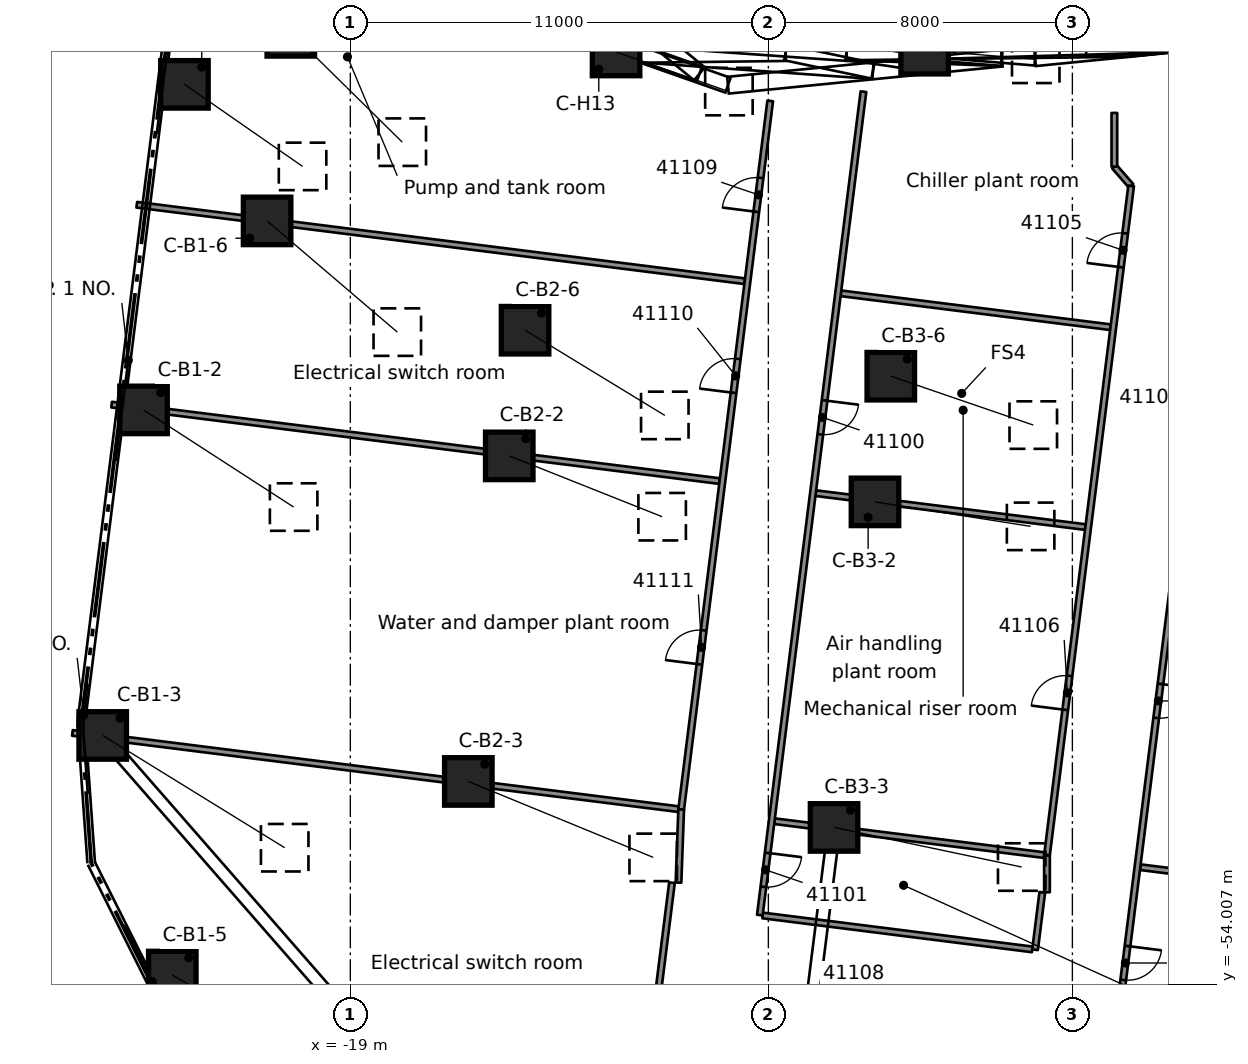
"""IFC4 building model, lengths in metres.
Left out: names, types, materials, properties, quantities, classifications, styles, units other than length and angle.
Written with IfcOpenShell. Run it as: python <this file> out.ifc"""

import sys

from ifc_helpers import new_model, si_unit, direction, frame, frame_2d, origin, origin_2d, place, context, subcontext, project, spatial, rectangle, extrude, element, fill, save


model = new_model("IFC4")
c1 = context("Model", 3, precision=1e-05, world=origin(), true_north=direction((0.0, 1.0)))
c2 = subcontext(c1, "Body", "Model", "MODEL_VIEW")
j1 = project(units=[si_unit("LENGTHUNIT", "METRE"), si_unit("PLANEANGLEUNIT", "RADIAN")], contexts=[c1])
p1 = place(None, origin())
s1 = spatial("IfcSite", under=j1, at=p1, CompositionType="ELEMENT")
p2 = place(p1, origin())
s2 = spatial("IfcBuilding", under=s1, at=p2, CompositionType="ELEMENT")
p3 = place(p2, frame((0.0, 0.0, 206.1)))
s3 = spatial("IfcBuildingStorey", under=s2, at=p3, CompositionType="ELEMENT", Elevation=206.1)
p4 = place(p3, frame((-23.365, -30.322, 0.46), z_axis=(0.604547981871, -0.419954265804, 0.676875285594), x_axis=(0.570514289854, 0.821287674979, 0.0)))
e1 = element("IfcColumn", 1, at=p4, inside=s3, PredefinedType="COLUMN", context=c2, shape_type="SweptSolid", body=[
    extrude(rectangle(XDim=1.25, YDim=1.25, at=origin_2d()), origin(), (0.0, 0.0, 1.0), 5.141),
])
p5 = place(p3, frame((-24.442, -38.888, 0.507), z_axis=(0.681472154292, -0.44100460198, 0.584046782336), x_axis=(0.543296460318, 0.839540919912, 0.0)))
e2 = element("IfcColumn", 2, at=p5, inside=s3, PredefinedType="COLUMN", context=c2, shape_type="SweptSolid", body=[
    extrude(rectangle(XDim=1.25, YDim=1.25, at=origin_2d()), origin(), (0.0, 0.0, 1.0), 5.796),
])
p6 = place(p3, frame((-25.516, -47.454, 0.538), z_axis=(0.732821218952, -0.451998568928, 0.50859645569), x_axis=(0.524966240831, 0.851123049851, 0.0)))
e3 = element("IfcColumn", 3, at=p6, inside=s3, PredefinedType="COLUMN", context=c2, shape_type="SweptSolid", body=[
    extrude(rectangle(XDim=1.25, YDim=1.25, at=origin_2d()), origin(), (0.0, 0.0, 1.0), 6.535),
])
p7 = place(p3, frame((-23.685, -53.758, 0.552), z_axis=(0.767524718549, -0.437360648077, 0.468637887852), x_axis=(0.495093298887, 0.86883981573, 0.0)))
e4 = element("IfcColumn", 4, at=p7, inside=s3, PredefinedType="COLUMN", context=c2, shape_type="SweptSolid", body=[
    extrude(rectangle(XDim=1.25, YDim=1.25, at=origin_2d()), origin(), (0.0, 0.0, 1.0), 7.033),
])
p8 = place(p3, frame((-21.19, -33.915, 0.499), z_axis=(0.60682574595, -0.518264559624, 0.602631197574), x_axis=(0.649438201848, 0.76041437518, 0.0)))
e5 = element("IfcColumn", 5, at=p8, inside=s3, PredefinedType="COLUMN", context=c2, shape_type="SweptSolid", body=[
    extrude(rectangle(XDim=1.25, YDim=1.25, at=origin_2d()), origin(), (0.0, 0.0, 1.0), 5.646),
])
p9 = place(p3, frame((-20.566, -28.954, 0.479), z_axis=(0.546625765271, -0.538435251848, 0.641317201009), x_axis=(0.701749238888, 0.712424035052, 0.0)))
e6 = element("IfcColumn", 6, at=p9, inside=s3, PredefinedType="COLUMN", context=c2, shape_type="SweptSolid", body=[
    extrude(rectangle(XDim=1.25, YDim=1.25, at=origin_2d()), origin(), (0.0, 0.0, 1.0), 5.365),
])
p10 = place(p3, frame((-14.818, -40.098, 0.49), z_axis=(0.729256121649, -0.29003851091, 0.619728304361), x_axis=(0.369562231152, 0.929205982173, 0.0)))
e7 = element("IfcColumn", 7, at=p10, inside=s3, PredefinedType="COLUMN", context=c2, shape_type="SweptSolid", body=[
    extrude(rectangle(XDim=1.25, YDim=1.25, at=origin_2d()), origin(), (0.0, 0.0, 1.0), 5.517),
])
p11 = place(p3, frame((-15.895, -48.664, 0.527), z_axis=(0.780516487065, -0.320557380948, 0.536690766587), x_axis=(0.379906795969, 0.925024770683, 0.0)))
e8 = element("IfcColumn", 8, at=p11, inside=s3, PredefinedType="COLUMN", context=c2, shape_type="SweptSolid", body=[
    extrude(rectangle(XDim=1.25, YDim=1.25, at=origin_2d()), origin(), (0.0, 0.0, 1.0), 6.233),
])
p12 = place(p3, frame((-14.402, -36.791, 0.489), z_axis=(0.668536196843, -0.40762020421, 0.622016979375), x_axis=(0.520585249555, 0.853809696564, 0.0)))
e9 = element("IfcColumn", 9, at=p12, inside=s3, PredefinedType="COLUMN", context=c2, shape_type="SweptSolid", body=[
    extrude(rectangle(XDim=1.25, YDim=1.25, at=origin_2d()), origin(), (0.0, 0.0, 1.0), 5.5),
])
p13 = place(p3, frame((-5.194, -41.308, 0.481), z_axis=(0.760399313184, -0.119547665228, 0.638358238177), x_axis=(0.155309269124, 0.987865897237, 0.0)))
e10 = element("IfcColumn", 10, at=p13, inside=s3, PredefinedType="COLUMN", context=c2, shape_type="SweptSolid", body=[
    extrude(rectangle(XDim=1.25, YDim=1.25, at=origin_2d()), origin(), (0.0, 0.0, 1.0), 5.385),
])
p14 = place(p3, frame((-6.271, -49.874, 0.52), z_axis=(0.814502781534, -0.171872731711, 0.554116398393), x_axis=(0.206468811523, 0.978453182257, 0.0)))
e11 = element("IfcColumn", 11, at=p14, inside=s3, PredefinedType="COLUMN", context=c2, shape_type="SweptSolid", body=[
    extrude(rectangle(XDim=1.25, YDim=1.25, at=origin_2d()), origin(), (0.0, 0.0, 1.0), 6.062),
])
p15 = place(p3, frame((-4.778, -38.001, 0.471), z_axis=(0.71272637294, -0.244506546799, 0.657447842713), x_axis=(0.324494397728, 0.945887617978, 0.0)))
e12 = element("IfcColumn", 12, at=p15, inside=s3, PredefinedType="COLUMN", context=c2, shape_type="SweptSolid", body=[
    extrude(rectangle(XDim=1.25, YDim=1.25, at=origin_2d()), origin(), (0.0, 0.0, 1.0), 5.26),
])
p16 = place(p3, frame((-3.888, -29.423, 0.394), z_axis=(0.628357788529, -0.051576127766, 0.776212852663), x_axis=(0.081805717627, 0.99664829532, 0.0)))
e13 = element("IfcColumn", 13, at=p16, inside=s3, PredefinedType="COLUMN", context=c2, shape_type="SweptSolid", body=[
    extrude(rectangle(XDim=1.25, YDim=1.25, at=origin_2d()), origin(), (0.0, 0.0, 1.0), 4.653),
])
p17 = place(p3, frame((-12.007, -29.47, 0.413), z_axis=(0.623513084536, -0.21882689292, 0.750563937548), x_axis=(0.331155585117, 0.943576164623, 0.0)))
e14 = element("IfcColumn", 14, at=p17, inside=s3, PredefinedType="COLUMN", context=c2, shape_type="SweptSolid", body=[
    extrude(rectangle(XDim=1.25, YDim=1.25, at=origin_2d()), origin(), (0.0, 0.0, 1.0), 4.762),
])
p18 = place(p3, frame((-8.15, -52.19, 0.0), z_axis=(0.0, 0.0, 1.0), x_axis=(0.992168754775, -0.124904611796, 0.0)))
e15 = element("IfcWall", 15, at=p18, inside=s3, PredefinedType="PARTITIONING", context=c2, shape_type="SweptSolid", body=[
    extrude(rectangle(XDim=7.15, YDim=0.15, at=frame_2d((3.575, 0.0))), origin(), (0.0, 0.0, 1.0), 3.98),
])
p19 = place(p3, frame((-26.313, -47.387, 0.0), z_axis=(0.0, 0.0, 1.0), x_axis=(0.992178228876, -0.124829332068, 0.0)))
e16 = element("IfcWall", 16, at=p19, inside=s3, PredefinedType="PARTITIONING", context=c2, shape_type="SweptSolid", body=[
    extrude(rectangle(XDim=16.071, YDim=0.15, at=frame_2d((8.035, 0.0))), origin(), (0.0, 0.0, 1.0), 3.98),
])
p20 = place(p3, frame((-7.838, -49.71, 0.0), z_axis=(0.0, 0.0, 1.0), x_axis=(0.992173014732, -0.124870768549, 0.0)))
e17 = element("IfcWall", 17, at=p20, inside=s3, PredefinedType="PARTITIONING", context=c2, shape_type="SweptSolid", body=[
    extrude(rectangle(XDim=7.152, YDim=0.15, at=frame_2d((3.576, 0.0))), origin(), (0.0, 0.0, 1.0), 3.98),
])
p21 = place(p3, frame((1.787, -50.92, 0.0), z_axis=(0.0, 0.0, 1.0), x_axis=(0.992180531957, -0.12481102518, 0.0)))
e18 = element("IfcWall", 18, at=p21, inside=s3, PredefinedType="PARTITIONING", context=c2, shape_type="SweptSolid", body=[
    extrude(rectangle(XDim=16.914, YDim=0.15, at=frame_2d((8.457, 0.0))), origin(), (0.0, 0.0, 1.0), 3.98),
])
p22 = place(p3, frame((-25.282, -38.749, 0.0), z_axis=(0.0, 0.0, 1.0), x_axis=(0.99218536192, -0.124772623567, 0.0)))
e19 = element("IfcWall", 19, at=p22, inside=s3, PredefinedType="PARTITIONING", context=c2, shape_type="SweptSolid", body=[
    extrude(rectangle(XDim=16.125, YDim=0.15, at=frame_2d((8.062, 0.0))), origin(), (0.0, 0.0, 1.0), 3.98),
])
p23 = place(p3, frame((-6.752, -41.078, 0.0), z_axis=(0.0, 0.0, 1.0), x_axis=(0.992168754775, -0.124904611796, 0.0)))
e20 = element("IfcWall", 20, at=p23, inside=s3, PredefinedType="PARTITIONING", context=c2, shape_type="SweptSolid", body=[
    extrude(rectangle(XDim=7.15, YDim=0.15, at=frame_2d((3.575, 0.0))), origin(), (0.0, 0.0, 1.0), 3.98),
])
p24 = place(p3, frame((-24.62, -33.49, 0.0), z_axis=(0.0, 0.0, 1.0), x_axis=(0.992184418995, -0.124780121428, 0.0)))
e21 = element("IfcWall", 21, at=p24, inside=s3, PredefinedType="PARTITIONING", context=c2, shape_type="SweptSolid", body=[
    extrude(rectangle(XDim=16.124, YDim=0.15, at=frame_2d((8.062, 0.0))), origin(), (0.0, 0.0, 1.0), 3.98),
])
p25 = place(p3, frame((-6.091, -35.82, 0.0), z_axis=(0.0, 0.0, 1.0), x_axis=(0.992189898708, -0.124736541969, 0.0)))
e22 = element("IfcWall", 22, at=p25, inside=s3, PredefinedType="PARTITIONING", context=c2, shape_type="SweptSolid", body=[
    extrude(rectangle(XDim=7.15, YDim=0.15, at=frame_2d((3.575, 0.0))), origin(), (0.0, 0.0, 1.0), 3.98),
])
p26 = place(p3, frame((1.105, -32.488, 0.0), z_axis=(0.0, 0.0, 1.0), x_axis=(0.657060992412, -0.753837417651, 0.0)))
e23 = element("IfcWall", 23, at=p26, inside=s3, PredefinedType="PARTITIONING", context=c2, shape_type="SweptSolid", body=[
    extrude(rectangle(XDim=0.671, YDim=0.15, at=frame_2d((0.335, 0.0))), origin(), (0.0, 0.0, 1.0), 3.98),
])
p27 = place(p3, frame((-10.943, -54.561, 0.0), z_axis=(0.0, 0.0, 1.0), x_axis=(0.124928843821, 0.992165703893, 0.0)))
e24 = element("IfcWall", 24, at=p27, inside=s3, PredefinedType="PARTITIONING", context=c2, shape_type="SweptSolid", body=[
    extrude(rectangle(XDim=3.26, YDim=0.15, at=frame_2d((1.63, 0.0))), origin(), (0.0, 0.0, 1.0), 3.98),
])
p28 = place(p3, frame((4.328, -30.123, 0.0), z_axis=(0.0, 0.0, 1.0), x_axis=(-0.124803349917, -0.992181497434, 0.0)))
e25 = element("IfcWall", 25, at=p28, inside=s3, PredefinedType="PARTITIONING", context=c2, shape_type="SweptSolid", body=[
    extrude(rectangle(XDim=26.153, YDim=0.15, at=frame_2d((13.076, 0.0))), origin(), (0.0, 0.0, 1.0), 3.98),
])
p29 = place(p28, frame((2.946, 0.0, 0.0)))
e26 = element("IfcOpeningElement", 26, at=p29, cuts=e25, PredefinedType="OPENING", context=c2, shape_type="SweptSolid", body=[
    extrude(rectangle(XDim=0.9, YDim=2.1, at=frame_2d((0.45, 1.05))), frame((0.0, 0.085, 0.0), z_axis=(0.0, -1.0, 0.0), x_axis=(1.0, 0.0, 0.0)), (0.0, 0.0, 1.0), 0.17),
])
p30 = place(p28, frame((9.803, 0.0, 0.0)))
e27 = element("IfcOpeningElement", 27, at=p30, cuts=e25, PredefinedType="OPENING", context=c2, shape_type="SweptSolid", body=[
    extrude(rectangle(XDim=0.9, YDim=2.1, at=frame_2d((0.45, 1.05))), frame((0.0, 0.085, 0.0), z_axis=(0.0, -1.0, 0.0), x_axis=(1.0, 0.0, 0.0)), (0.0, 0.0, 1.0), 0.17),
])
p31 = place(p28, frame((16.102, 0.0, 0.0)))
e28 = element("IfcOpeningElement", 28, at=p31, cuts=e25, PredefinedType="OPENING", context=c2, shape_type="SweptSolid", body=[
    extrude(rectangle(XDim=0.9, YDim=2.1, at=frame_2d((0.45, 1.05))), frame((0.0, 0.085, 0.0), z_axis=(0.0, -1.0, 0.0), x_axis=(1.0, 0.0, 0.0)), (0.0, 0.0, 1.0), 0.17),
])
p32 = place(p28, frame((23.052, 0.0, 0.0)))
e29 = element("IfcOpeningElement", 29, at=p32, cuts=e25, PredefinedType="OPENING", context=c2, shape_type="SweptSolid", body=[
    extrude(rectangle(XDim=0.9, YDim=2.1, at=frame_2d((0.45, 1.05))), frame((0.0, 0.085, 0.0), z_axis=(0.0, -1.0, 0.0), x_axis=(1.0, 0.0, 0.0)), (0.0, 0.0, 1.0), 0.17),
])
p33 = place(p28, frame((0.2, 0.0, 0.0)))
e30 = element("IfcOpeningElement", 30, at=p33, cuts=e25, PredefinedType="OPENING", context=c2, shape_type="SweptSolid", body=[
    extrude(rectangle(XDim=0.9, YDim=2.1, at=frame_2d((0.45, 1.05))), frame((0.0, 0.085, 0.0), z_axis=(0.0, -1.0, 0.0), x_axis=(1.0, 0.0, 0.0)), (0.0, 0.0, 1.0), 0.17),
])
p34 = place(p3, frame((-0.982, -53.092, 0.0), z_axis=(0.0, 0.0, 1.0), x_axis=(0.12472529348, 0.992191312785, 0.0)))
e31 = element("IfcWall", 31, at=p34, inside=s3, PredefinedType="PARTITIONING", context=c2, shape_type="SweptSolid", body=[
    extrude(rectangle(XDim=1.523, YDim=0.15, at=frame_2d((0.761, 0.0))), origin(), (0.0, 0.0, 1.0), 3.98),
])
p35 = place(p3, frame((-0.668, -50.6, 0.0), z_axis=(0.0, 0.0, 1.0), x_axis=(0.124761144716, 0.99218680538, 0.0)))
e32 = element("IfcWall", 32, at=p35, inside=s3, PredefinedType="PARTITIONING", context=c2, shape_type="SweptSolid", body=[
    extrude(rectangle(XDim=17.745, YDim=0.15, at=frame_2d((8.873, 0.0))), origin(), (0.0, 0.0, 1.0), 3.98),
])
p36 = place(p35, frame((15.588, 0.0, 0.0)))
e33 = element("IfcOpeningElement", 33, at=p36, cuts=e32, PredefinedType="OPENING", context=c2, shape_type="SweptSolid", body=[
    extrude(rectangle(XDim=0.9, YDim=2.1, at=frame_2d((0.45, 1.05))), frame((0.0, 0.085, 0.0), z_axis=(0.0, -1.0, 0.0), x_axis=(1.0, 0.0, 0.0)), (0.0, 0.0, 1.0), 0.17),
])
p37 = place(p35, frame((3.85, 0.0, 0.0)))
e34 = element("IfcOpeningElement", 34, at=p37, cuts=e32, PredefinedType="OPENING", context=c2, shape_type="SweptSolid", body=[
    extrude(rectangle(XDim=0.9, YDim=2.1, at=frame_2d((0.45, 1.05))), frame((0.0, 0.085, 0.0), z_axis=(0.0, -1.0, 0.0), x_axis=(1.0, 0.0, 0.0)), (0.0, 0.0, 1.0), 0.17),
])
p38 = place(p3, frame((-5.498, -30.515, 0.0), z_axis=(0.0, 0.0, 1.0), x_axis=(-0.12483829345, -0.992177101373, 0.0)))
e35 = element("IfcWall", 35, at=p38, inside=s3, PredefinedType="PARTITIONING", context=c2, shape_type="SweptSolid", body=[
    extrude(rectangle(XDim=21.837, YDim=0.15, at=frame_2d((10.918, 0.0))), origin(), (0.0, 0.0, 1.0), 3.98),
])
p39 = place(p38, frame((8.188, 0.0, 0.0)))
e36 = element("IfcOpeningElement", 36, at=p39, cuts=e35, PredefinedType="OPENING", context=c2, shape_type="SweptSolid", body=[
    extrude(rectangle(XDim=0.9, YDim=2.1, at=frame_2d((0.45, 1.05))), frame((0.0, 0.085, 0.0), z_axis=(0.0, -1.0, 0.0), x_axis=(1.0, 0.0, 0.0)), (0.0, 0.0, 1.0), 0.17),
])
p40 = place(p38, frame((20.187, 0.0, 0.0)))
e37 = element("IfcOpeningElement", 37, at=p40, cuts=e35, PredefinedType="OPENING", context=c2, shape_type="SweptSolid", body=[
    extrude(rectangle(XDim=0.9, YDim=2.1, at=frame_2d((0.45, 1.05))), frame((0.0, 0.085, 0.0), z_axis=(0.0, -1.0, 0.0), x_axis=(1.0, 0.0, 0.0)), (0.0, 0.0, 1.0), 0.17),
])
p41 = place(p3, frame((-10.294, -49.402, 0.0), z_axis=(0.0, 0.0, 1.0), x_axis=(0.124690335959, 0.992195706561, 0.0)))
e38 = element("IfcWall", 38, at=p41, inside=s3, PredefinedType="PARTITIONING", context=c2, shape_type="SweptSolid", body=[
    extrude(rectangle(XDim=18.791, YDim=0.15, at=frame_2d((9.396, 0.0))), origin(), (0.0, 0.0, 1.0), 3.98),
])
p42 = place(p41, frame((15.85, 0.0, 0.0)))
e39 = element("IfcOpeningElement", 39, at=p42, cuts=e38, PredefinedType="OPENING", context=c2, shape_type="SweptSolid", body=[
    extrude(rectangle(XDim=0.9, YDim=2.1, at=frame_2d((0.45, 1.05))), frame((0.0, 0.085, 0.0), z_axis=(0.0, -1.0, 0.0), x_axis=(1.0, 0.0, 0.0)), (0.0, 0.0, 1.0), 0.17),
])
p43 = place(p41, frame((11.05, 0.0, 0.0)))
e40 = element("IfcOpeningElement", 40, at=p43, cuts=e38, PredefinedType="OPENING", context=c2, shape_type="SweptSolid", body=[
    extrude(rectangle(XDim=0.9, YDim=2.1, at=frame_2d((0.45, 1.05))), frame((0.0, 0.085, 0.0), z_axis=(0.0, -1.0, 0.0), x_axis=(1.0, 0.0, 0.0)), (0.0, 0.0, 1.0), 0.17),
])
p44 = place(p41, frame((3.85, 0.0, 0.0)))
e41 = element("IfcOpeningElement", 41, at=p44, cuts=e38, PredefinedType="OPENING", context=c2, shape_type="SweptSolid", body=[
    extrude(rectangle(XDim=0.9, YDim=2.1, at=frame_2d((0.45, 1.05))), frame((0.0, 0.085, 0.0), z_axis=(0.0, -1.0, 0.0), x_axis=(1.0, 0.0, 0.0)), (0.0, 0.0, 1.0), 0.17),
])
p45 = place(p3, frame((-10.294, -49.402, 0.0), z_axis=(0.0, 0.0, 1.0), x_axis=(-0.03690377889, -0.999318823551, 0.0)))
e42 = element("IfcWall", 42, at=p45, inside=s3, PredefinedType="PARTITIONING", context=c2, shape_type="SweptSolid", body=[
    extrude(rectangle(XDim=1.925, YDim=0.15, at=frame_2d((0.962, 0.0))), origin(), (0.0, 0.0, 1.0), 3.98),
])
p46 = place(p3, frame((1.105, -32.488, 0.0), z_axis=(0.0, 0.0, 1.0), x_axis=(0.0, 1.0, 0.0)))
e43 = element("IfcWall", 43, at=p46, inside=s3, PredefinedType="PARTITIONING", context=c2, shape_type="SweptSolid", body=[
    extrude(rectangle(XDim=1.414, YDim=0.15, at=frame_2d((0.707, 0.0))), origin(), (0.0, 0.0, 1.0), 3.98),
])
p47 = place(p3, frame((-0.668, -51.58, 0.0), z_axis=(0.0, 0.0, 1.0), x_axis=(0.0, 1.0, 0.0)))
e44 = element("IfcWall", 44, at=p47, inside=s3, PredefinedType="PARTITIONING", context=c2, shape_type="SweptSolid", body=[
    extrude(rectangle(XDim=0.968, YDim=0.15, at=frame_2d((0.484, 0.0))), origin(), (0.0, 0.0, 1.0), 3.98),
])
p48 = place(p39, origin())
e45 = element("IfcDoor", 45, at=p48, inside=s3, OperationType="SINGLE_SWING_LEFT", PredefinedType="DOOR", context=c2, shape_type="SweptSolid", body=[
    extrude(rectangle(XDim=0.9, YDim=2.1, at=frame_2d((0.45, 1.05))), frame((0.0, 0.025, 0.0), z_axis=(0.0, -1.0, 0.0), x_axis=(1.0, 0.0, 0.0)), (0.0, 0.0, 1.0), 0.05),
])
fill(e36, e45)
p49 = place(p40, origin())
e46 = element("IfcDoor", 46, at=p49, inside=s3, OperationType="SINGLE_SWING_RIGHT", PredefinedType="DOOR", context=c2, shape_type="SweptSolid", body=[
    extrude(rectangle(XDim=0.9, YDim=2.1, at=frame_2d((0.45, 1.05))), frame((0.0, 0.025, 0.0), z_axis=(0.0, -1.0, 0.0), x_axis=(1.0, 0.0, 0.0)), (0.0, 0.0, 1.0), 0.05),
])
fill(e37, e46)
p50 = place(p31, origin())
e47 = element("IfcDoor", 47, at=p50, inside=s3, OperationType="SINGLE_SWING_RIGHT", PredefinedType="DOOR", context=c2, shape_type="SweptSolid", body=[
    extrude(rectangle(XDim=0.9, YDim=2.1, at=frame_2d((0.45, 1.05))), frame((0.0, 0.025, 0.0), z_axis=(0.0, -1.0, 0.0), x_axis=(1.0, 0.0, 0.0)), (0.0, 0.0, 1.0), 0.05),
])
fill(e28, e47)
p51 = place(p36, origin())
e48 = element("IfcDoor", 48, at=p51, inside=s3, OperationType="SINGLE_SWING_RIGHT", PredefinedType="DOOR", context=c2, shape_type="SweptSolid", body=[
    extrude(rectangle(XDim=0.9, YDim=2.1, at=frame_2d((0.45, 1.05))), frame((0.0, 0.025, 0.0), z_axis=(0.0, -1.0, 0.0), x_axis=(1.0, 0.0, 0.0)), (0.0, 0.0, 1.0), 0.05),
])
fill(e33, e48)
p52 = place(p37, origin())
e49 = element("IfcDoor", 49, at=p52, inside=s3, OperationType="SINGLE_SWING_LEFT", PredefinedType="DOOR", context=c2, shape_type="SweptSolid", body=[
    extrude(rectangle(XDim=0.9, YDim=2.1, at=frame_2d((0.45, 1.05))), frame((0.0, 0.025, 0.0), z_axis=(0.0, -1.0, 0.0), x_axis=(1.0, 0.0, 0.0)), (0.0, 0.0, 1.0), 0.05),
])
fill(e34, e49)
p53 = place(p32, origin())
e50 = element("IfcDoor", 50, at=p53, inside=s3, OperationType="SINGLE_SWING_RIGHT", PredefinedType="DOOR", context=c2, shape_type="SweptSolid", body=[
    extrude(rectangle(XDim=0.9, YDim=2.1, at=frame_2d((0.45, 1.05))), frame((0.0, 0.025, 0.0), z_axis=(0.0, -1.0, 0.0), x_axis=(1.0, 0.0, 0.0)), (0.0, 0.0, 1.0), 0.05),
])
fill(e29, e50)
p54 = place(p42, origin())
e51 = element("IfcDoor", 51, at=p54, inside=s3, OperationType="SINGLE_SWING_RIGHT", PredefinedType="DOOR", context=c2, shape_type="SweptSolid", body=[
    extrude(rectangle(XDim=0.9, YDim=2.1, at=frame_2d((0.45, 1.05))), frame((0.0, 0.025, 0.0), z_axis=(0.0, -1.0, 0.0), x_axis=(1.0, 0.0, 0.0)), (0.0, 0.0, 1.0), 0.05),
])
fill(e39, e51)
p55 = place(p43, origin())
e52 = element("IfcDoor", 52, at=p55, inside=s3, OperationType="SINGLE_SWING_RIGHT", PredefinedType="DOOR", context=c2, shape_type="SweptSolid", body=[
    extrude(rectangle(XDim=0.9, YDim=2.1, at=frame_2d((0.45, 1.05))), frame((0.0, 0.025, 0.0), z_axis=(0.0, -1.0, 0.0), x_axis=(1.0, 0.0, 0.0)), (0.0, 0.0, 1.0), 0.05),
])
fill(e40, e52)
p56 = place(p44, origin())
e53 = element("IfcDoor", 53, at=p56, inside=s3, OperationType="SINGLE_SWING_LEFT", PredefinedType="DOOR", context=c2, shape_type="SweptSolid", body=[
    extrude(rectangle(XDim=0.9, YDim=2.1, at=frame_2d((0.45, 1.05))), frame((0.0, 0.025, 0.0), z_axis=(0.0, -1.0, 0.0), x_axis=(1.0, 0.0, 0.0)), (0.0, 0.0, 1.0), 0.05),
])
fill(e41, e53)
save(model, sys.argv[1])
